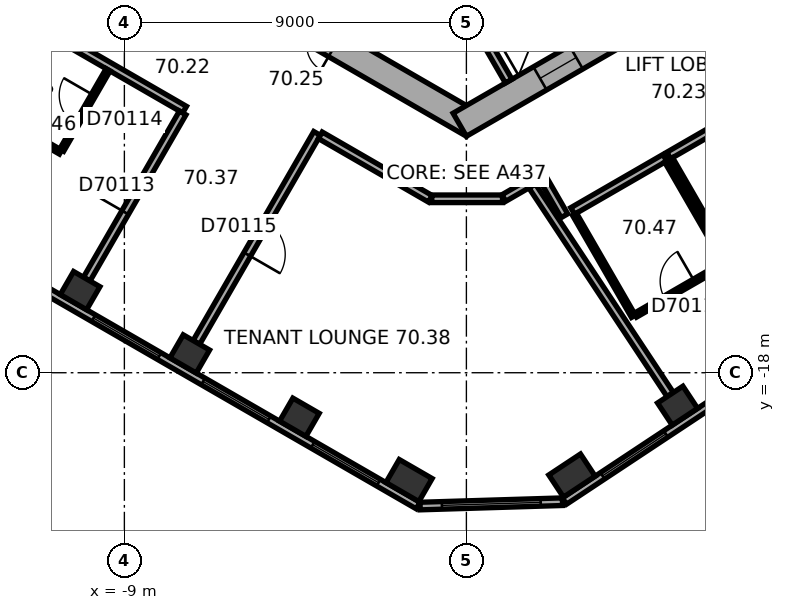
"""IFC4 building model, lengths in metres.
Left out: names, types, materials, properties, quantities, classifications, styles, units other than length and angle.
Written with IfcOpenShell. Run it as: python <this file> out.ifc"""

import sys

from ifc_helpers import new_model, si_unit, direction, frame, frame_2d, origin, origin_2d, place, context, subcontext, project, spatial, rectangle, extrude, element, fill, save


model = new_model("IFC4")
c1 = context("Model", 3, precision=1e-05, world=origin(), true_north=direction((0.0, 1.0)))
c2 = subcontext(c1, "Body", "Model", "MODEL_VIEW")
j1 = project(units=[si_unit("LENGTHUNIT", "METRE"), si_unit("PLANEANGLEUNIT", "RADIAN")], contexts=[c1])
p1 = place(None, origin())
s1 = spatial("IfcSite", under=j1, at=p1, CompositionType="ELEMENT")
p2 = place(p1, origin())
s2 = spatial("IfcBuilding", under=s1, at=p2, CompositionType="ELEMENT")
p3 = place(p2, frame((0.0, 0.0, 285.7)))
s3 = spatial("IfcBuildingStorey", under=s2, at=p3, CompositionType="ELEMENT", Elevation=285.7)
for number, where, z_axis, x_axis in (
    (1, (-10.165, -15.84, 0.0), (0.0, 0.0, 1.0), (0.866, -0.5, 0.0)),
    (2, (-7.28, -17.505, 0.0), (0.0, 0.0, 1.0), (0.866, -0.5, 0.0)),
    (3, (-4.395, -19.171, 0.0), (0.0, 0.0, 1.0), (0.866, -0.5, 0.0)),
):
    element("IfcColumn", number, at=place(p3, frame(where, z_axis=z_axis, x_axis=x_axis)), inside=s3, PredefinedType="COLUMN", context=c2, shape_type="SweptSolid", body=[
        extrude(rectangle(XDim=0.8, YDim=0.7, at=origin_2d()), origin(), (0.0, 0.0, 1.0), 3.7),
    ])
for number, where, z_axis, x_axis in (
    (4, (-1.509, -20.837, 0.0), (0.0, 0.0, 1.0), (0.866, -0.5, 0.0)),
    (5, (2.778, -20.706, 0.0), (0.0, 0.0, 1.0), (0.834, 0.552, 0.0)),
):
    element("IfcColumn", number, at=place(p3, frame(where, z_axis=z_axis, x_axis=x_axis)), inside=s3, PredefinedType="COLUMN", context=c2, shape_type="SweptSolid", body=[
        extrude(rectangle(XDim=1.0, YDim=0.7, at=origin_2d()), origin(), (0.0, 0.0, 1.0), 3.7),
    ])
p4 = place(p3, frame((5.557, -18.867, 0.0), z_axis=(0.0, 0.0, 1.0), x_axis=(0.833885822067, 0.551936985312, 0.0)))
e6 = element("IfcColumn", 6, at=p4, inside=s3, PredefinedType="COLUMN", context=c2, shape_type="SweptSolid", body=[
    extrude(rectangle(XDim=0.8, YDim=0.7, at=origin_2d()), origin(), (0.0, 0.0, 1.0), 3.7),
])
p5 = place(p3, frame((-10.025, -5.586, 0.0), z_axis=(0.0, 0.0, 1.0), x_axis=(0.866026453023, -0.499998182661, 0.0)))
e7 = element("IfcWall", 7, at=p5, inside=s3, PredefinedType="SHEAR", context=c2, shape_type="SweptSolid", body=[
    extrude(rectangle(XDim=11.778, YDim=0.7, at=frame_2d((5.889, 0.0))), origin(), (0.0, 0.0, 1.0), 3.7),
])
p6 = place(p5, frame((6.089, 0.0, 0.0)))
e8 = element("IfcOpeningElement", 8, at=p6, cuts=e7, PredefinedType="OPENING", context=c2, shape_type="SweptSolid", body=[
    extrude(rectangle(XDim=1.5, YDim=2.1, at=frame_2d((0.75, 1.05))), frame((0.0, 0.36, 0.0), z_axis=(0.0, -1.0, 0.0), x_axis=(1.0, 0.0, 0.0)), (0.0, 0.0, 1.0), 0.72),
])
p7 = place(p5, frame((1.539, 0.0, 0.0)))
e9 = element("IfcOpeningElement", 9, at=p7, cuts=e7, PredefinedType="OPENING", context=c2, shape_type="SweptSolid", body=[
    extrude(rectangle(XDim=1.1, YDim=2.1, at=frame_2d((0.55, 1.05))), frame((0.0, 0.36, 0.0), z_axis=(0.0, -1.0, 0.0), x_axis=(1.0, 0.0, 0.0)), (0.0, 0.0, 1.0), 0.72),
])
p8 = place(p5, frame((4.139, 0.0, 0.0)))
e10 = element("IfcOpeningElement", 10, at=p8, cuts=e7, PredefinedType="OPENING", context=c2, shape_type="SweptSolid", body=[
    extrude(rectangle(XDim=1.1, YDim=2.1, at=frame_2d((0.55, 1.05))), frame((0.0, 0.36, 0.0), z_axis=(0.0, -1.0, 0.0), x_axis=(1.0, 0.0, 0.0)), (0.0, 0.0, 1.0), 0.72),
])
p9 = place(p3, frame((-0.175, -11.475, 0.0), z_axis=(0.0, 0.0, 1.0), x_axis=(0.866026453023, 0.499998182661, 0.0)))
e11 = element("IfcWall", 11, at=p9, inside=s3, PredefinedType="SHEAR", context=c2, shape_type="SweptSolid", body=[
    extrude(rectangle(XDim=11.778, YDim=0.7, at=frame_2d((5.889, 0.0))), origin(), (0.0, 0.0, 1.0), 3.7),
])
p10 = place(p9, frame((2.439, 0.0, 0.0)))
e12 = element("IfcOpeningElement", 12, at=p10, cuts=e11, PredefinedType="OPENING", context=c2, shape_type="SweptSolid", body=[
    extrude(rectangle(XDim=1.1, YDim=2.1, at=frame_2d((0.55, 1.05))), frame((0.0, 0.36, 0.0), z_axis=(0.0, -1.0, 0.0), x_axis=(1.0, 0.0, 0.0)), (0.0, 0.0, 1.0), 0.72),
])
p11 = place(p9, frame((5.039, 0.0, 0.0)))
e13 = element("IfcOpeningElement", 13, at=p11, cuts=e11, PredefinedType="OPENING", context=c2, shape_type="SweptSolid", body=[
    extrude(rectangle(XDim=1.1, YDim=2.1, at=frame_2d((0.55, 1.05))), frame((0.0, 0.36, 0.0), z_axis=(0.0, -1.0, 0.0), x_axis=(1.0, 0.0, 0.0)), (0.0, 0.0, 1.0), 0.72),
])
p12 = place(p9, frame((7.639, 0.0, 0.0)))
e14 = element("IfcOpeningElement", 14, at=p12, cuts=e11, PredefinedType="OPENING", context=c2, shape_type="SweptSolid", body=[
    extrude(rectangle(XDim=1.1, YDim=2.1, at=frame_2d((0.55, 1.05))), frame((0.0, 0.36, 0.0), z_axis=(0.0, -1.0, 0.0), x_axis=(1.0, 0.0, 0.0)), (0.0, 0.0, 1.0), 0.72),
])
p13 = place(p3, frame((-16.626, -12.629, 0.0), z_axis=(0.0, 0.0, 1.0), x_axis=(0.866026460444, -0.499998169808, 0.0)))
e15 = element("IfcWall", 15, at=p13, inside=s3, PredefinedType="STANDARD", context=c2, shape_type="SweptSolid", body=[
    extrude(rectangle(XDim=17.731, YDim=0.2, at=frame_2d((8.866, 0.0))), origin(), (0.0, 0.0, 1.0), 3.7),
])
p14 = place(p13, frame((1.203, 0.0, 0.9)))
e16 = element("IfcOpeningElement", 16, at=p14, cuts=e15, PredefinedType="OPENING", context=c2, shape_type="SweptSolid", body=[
    extrude(rectangle(XDim=2.0, YDim=2.0, at=frame_2d((1.0, 1.0))), frame((0.0, 0.11, 0.0), z_axis=(0.0, -1.0, 0.0), x_axis=(1.0, 0.0, 0.0)), (0.0, 0.0, 1.0), 0.22),
])
p15 = place(p13, frame((4.535, 0.0, 0.9)))
e17 = element("IfcOpeningElement", 17, at=p15, cuts=e15, PredefinedType="OPENING", context=c2, shape_type="SweptSolid", body=[
    extrude(rectangle(XDim=2.0, YDim=2.0, at=frame_2d((1.0, 1.0))), frame((0.0, 0.11, 0.0), z_axis=(0.0, -1.0, 0.0), x_axis=(1.0, 0.0, 0.0)), (0.0, 0.0, 1.0), 0.22),
])
p16 = place(p13, frame((7.867, 0.0, 0.9)))
e18 = element("IfcOpeningElement", 18, at=p16, cuts=e15, PredefinedType="OPENING", context=c2, shape_type="SweptSolid", body=[
    extrude(rectangle(XDim=2.0, YDim=2.0, at=frame_2d((1.0, 1.0))), frame((0.0, 0.11, 0.0), z_axis=(0.0, -1.0, 0.0), x_axis=(1.0, 0.0, 0.0)), (0.0, 0.0, 1.0), 0.22),
])
p17 = place(p13, frame((11.198, 0.0, 0.9)))
e19 = element("IfcOpeningElement", 19, at=p17, cuts=e15, PredefinedType="OPENING", context=c2, shape_type="SweptSolid", body=[
    extrude(rectangle(XDim=2.0, YDim=2.0, at=frame_2d((1.0, 1.0))), frame((0.0, 0.11, 0.0), z_axis=(0.0, -1.0, 0.0), x_axis=(1.0, 0.0, 0.0)), (0.0, 0.0, 1.0), 0.22),
])
p18 = place(p13, frame((14.53, 0.0, 0.9)))
e20 = element("IfcOpeningElement", 20, at=p18, cuts=e15, PredefinedType="OPENING", context=c2, shape_type="SweptSolid", body=[
    extrude(rectangle(XDim=2.0, YDim=2.0, at=frame_2d((1.0, 1.0))), frame((0.0, 0.11, 0.0), z_axis=(0.0, -1.0, 0.0), x_axis=(1.0, 0.0, 0.0)), (0.0, 0.0, 1.0), 0.22),
])
p19 = place(p3, frame((-1.217, -21.508, 0.0), z_axis=(0.0, 0.0, 1.0), x_axis=(0.99953295295, 0.030559384285, 0.0)))
e21 = element("IfcWall", 21, at=p19, inside=s3, PredefinedType="STANDARD", context=c2, shape_type="SweptSolid", body=[
    extrude(rectangle(XDim=3.747, YDim=0.2, at=frame_2d((1.874, 0.0))), origin(), (0.0, 0.0, 1.0), 3.7),
])
p20 = place(p19, frame((0.573, 0.0, 0.9)))
e22 = element("IfcOpeningElement", 22, at=p20, cuts=e21, PredefinedType="OPENING", context=c2, shape_type="SweptSolid", body=[
    extrude(rectangle(XDim=2.6, YDim=2.0, at=frame_2d((1.3, 1.0))), frame((0.0, 0.11, 0.0), z_axis=(0.0, -1.0, 0.0), x_axis=(1.0, 0.0, 0.0)), (0.0, 0.0, 1.0), 0.22),
])
p21 = place(p3, frame((2.58, -21.377, 0.0), z_axis=(0.0, 0.0, 1.0), x_axis=(0.833888592176, 0.551932800112, 0.0)))
e23 = element("IfcWall", 23, at=p21, inside=s3, PredefinedType="STANDARD", context=c2, shape_type="SweptSolid", body=[
    extrude(rectangle(XDim=17.731, YDim=0.2, at=frame_2d((8.866, 0.0))), origin(), (0.0, 0.0, 1.0), 3.7),
])
p22 = place(p21, frame((1.202, 0.0, 0.9)))
e24 = element("IfcOpeningElement", 24, at=p22, cuts=e23, PredefinedType="OPENING", context=c2, shape_type="SweptSolid", body=[
    extrude(rectangle(XDim=2.0, YDim=2.0, at=frame_2d((1.0, 1.0))), frame((0.0, 0.11, 0.0), z_axis=(0.0, -1.0, 0.0), x_axis=(1.0, 0.0, 0.0)), (0.0, 0.0, 1.0), 0.22),
])
p23 = place(p21, frame((4.533, 0.0, 0.9)))
e25 = element("IfcOpeningElement", 25, at=p23, cuts=e23, PredefinedType="OPENING", context=c2, shape_type="SweptSolid", body=[
    extrude(rectangle(XDim=2.0, YDim=2.0, at=frame_2d((1.0, 1.0))), frame((0.0, 0.11, 0.0), z_axis=(0.0, -1.0, 0.0), x_axis=(1.0, 0.0, 0.0)), (0.0, 0.0, 1.0), 0.22),
])
p24 = place(p21, frame((7.865, 0.0, 0.9)))
e26 = element("IfcOpeningElement", 26, at=p24, cuts=e23, PredefinedType="OPENING", context=c2, shape_type="SweptSolid", body=[
    extrude(rectangle(XDim=2.0, YDim=2.0, at=frame_2d((1.0, 1.0))), frame((0.0, 0.11, 0.0), z_axis=(0.0, -1.0, 0.0), x_axis=(1.0, 0.0, 0.0)), (0.0, 0.0, 1.0), 0.22),
])
p25 = place(p21, frame((11.197, 0.0, 0.9)))
e27 = element("IfcOpeningElement", 27, at=p25, cuts=e23, PredefinedType="OPENING", context=c2, shape_type="SweptSolid", body=[
    extrude(rectangle(XDim=2.0, YDim=2.0, at=frame_2d((1.0, 1.0))), frame((0.0, 0.11, 0.0), z_axis=(0.0, -1.0, 0.0), x_axis=(1.0, 0.0, 0.0)), (0.0, 0.0, 1.0), 0.22),
])
p26 = place(p21, frame((14.528, 0.0, 0.9)))
e28 = element("IfcOpeningElement", 28, at=p26, cuts=e23, PredefinedType="OPENING", context=c2, shape_type="SweptSolid", body=[
    extrude(rectangle(XDim=2.0, YDim=2.0, at=frame_2d((1.0, 1.0))), frame((0.0, 0.11, 0.0), z_axis=(0.0, -1.0, 0.0), x_axis=(1.0, 0.0, 0.0)), (0.0, 0.0, 1.0), 0.22),
])
p27 = place(p3, frame((0.013, -8.422, 0.0), z_axis=(0.0, 0.0, 1.0), x_axis=(0.500077893725, -0.86598042715, 0.0)))
e29 = element("IfcWall", 29, at=p27, inside=s3, PredefinedType="PARTITIONING", context=c2, shape_type="SweptSolid", body=[
    extrude(rectangle(XDim=2.2, YDim=0.2, at=frame_2d((1.1, 0.0))), origin(), (0.0, 0.0, 1.0), 3.42),
])
p28 = place(p3, frame((-11.285, -8.844, 0.0), z_axis=(0.0, 0.0, 1.0), x_axis=(0.866021785011, -0.500006267848, 0.0)))
e30 = element("IfcWall", 30, at=p28, inside=s3, PredefinedType="PARTITIONING", context=c2, shape_type="SweptSolid", body=[
    extrude(rectangle(XDim=4.468, YDim=0.2, at=frame_2d((2.234, 0.0))), origin(), (0.0, 0.0, 1.0), 3.42),
])
p29 = place(p3, frame((-10.679, -12.195, 0.0), z_axis=(0.0, 0.0, 1.0), x_axis=(-0.866037418504, 0.499979189318, 0.0)))
e31 = element("IfcWall", 31, at=p29, inside=s3, PredefinedType="PARTITIONING", context=c2, shape_type="SweptSolid", body=[
    extrude(rectangle(XDim=2.14, YDim=0.12, at=frame_2d((1.07, 0.0))), origin(), (0.0, 0.0, 1.0), 3.42),
])
p30 = place(p3, frame((-9.99, -15.537, 0.0), z_axis=(0.0, 0.0, 1.0), x_axis=(0.499966611936, 0.866044679534, 0.0)))
e32 = element("IfcWall", 32, at=p30, inside=s3, PredefinedType="PARTITIONING", context=c2, shape_type="SweptSolid", body=[
    extrude(rectangle(XDim=5.049, YDim=0.2, at=frame_2d((2.524, 0.0))), origin(), (0.0, 0.0, 1.0), 2.87),
])
p31 = place(p30, frame((2.024, 0.0, 0.0)))
e33 = element("IfcOpeningElement", 33, at=p31, cuts=e32, PredefinedType="OPENING", context=c2, shape_type="SweptSolid", body=[
    extrude(rectangle(XDim=1.0, YDim=2.1, at=frame_2d((0.5, 1.05))), frame((0.0, 0.11, 0.0), z_axis=(0.0, -1.0, 0.0), x_axis=(1.0, 0.0, 0.0)), (0.0, 0.0, 1.0), 0.22),
])
p32 = place(p3, frame((-9.429, -10.03, 0.0), z_axis=(0.0, 0.0, 1.0), x_axis=(-0.500034220881, -0.866005645448, 0.0)))
e34 = element("IfcWall", 34, at=p32, inside=s3, PredefinedType="PARTITIONING", context=c2, shape_type="SweptSolid", body=[
    extrude(rectangle(XDim=2.44, YDim=0.12, at=frame_2d((1.22, 0.0))), origin(), (0.0, 0.0, 1.0), 3.42),
])
p33 = place(p32, frame((0.77, 0.0, 0.0)))
e35 = element("IfcOpeningElement", 35, at=p33, cuts=e34, PredefinedType="OPENING", context=c2, shape_type="SweptSolid", body=[
    extrude(rectangle(XDim=0.9, YDim=2.1, at=frame_2d((0.45, 1.05))), frame((0.0, 0.07, 0.0), z_axis=(0.0, -1.0, 0.0), x_axis=(1.0, 0.0, 0.0)), (0.0, 0.0, 1.0), 0.14),
])
p34 = place(p3, frame((-7.105, -17.202, 0.0), z_axis=(0.0, 0.0, 1.0), x_axis=(0.499988692146, 0.866031932279, 0.0)))
e36 = element("IfcWall", 36, at=p34, inside=s3, PredefinedType="PARTITIONING", context=c2, shape_type="SweptSolid", body=[
    extrude(rectangle(XDim=6.35, YDim=0.2, at=frame_2d((3.175, 0.0))), origin(), (0.0, 0.0, 1.0), 3.42),
])
p35 = place(p34, frame((2.675, 0.0, 0.0)))
e37 = element("IfcOpeningElement", 37, at=p35, cuts=e36, PredefinedType="OPENING", context=c2, shape_type="SweptSolid", body=[
    extrude(rectangle(XDim=1.0, YDim=2.1, at=frame_2d((0.5, 1.05))), frame((0.0, 0.11, 0.0), z_axis=(0.0, -1.0, 0.0), x_axis=(1.0, 0.0, 0.0)), (0.0, 0.0, 1.0), 0.22),
])
p36 = place(p3, frame((-3.843, -11.753, 0.0), z_axis=(0.0, 0.0, 1.0), x_axis=(0.866031037473, -0.499990242038, 0.0)))
e38 = element("IfcWall", 38, at=p36, inside=s3, PredefinedType="PARTITIONING", context=c2, shape_type="SweptSolid", body=[
    extrude(rectangle(XDim=3.341, YDim=0.2, at=frame_2d((1.67, 0.0))), origin(), (0.0, 0.0, 1.0), 3.42),
])
p37 = place(p3, frame((-0.91, -13.423, 0.0), z_axis=(0.0, 0.0, 1.0), x_axis=(1.0, 0.0, 0.0)))
e39 = element("IfcWall", 39, at=p37, inside=s3, PredefinedType="PARTITIONING", context=c2, shape_type="SweptSolid", body=[
    extrude(rectangle(XDim=1.86, YDim=0.2, at=frame_2d((0.93, 0.0))), origin(), (0.0, 0.0, 1.0), 3.42),
])
p38 = place(p3, frame((0.985, -13.403, 0.0), z_axis=(0.0, 0.0, 1.0), x_axis=(0.866032814021, 0.499987164874, 0.0)))
e40 = element("IfcWall", 40, at=p38, inside=s3, PredefinedType="PARTITIONING", context=c2, shape_type="SweptSolid", body=[
    extrude(rectangle(XDim=0.798, YDim=0.2, at=frame_2d((0.399, 0.0))), origin(), (0.0, 0.0, 1.0), 3.42),
])
p39 = place(p3, frame((1.979, -12.829, 0.0), z_axis=(0.0, 0.0, 1.0), x_axis=(0.500074377092, -0.865982457891, 0.0)))
e41 = element("IfcWall", 41, at=p39, inside=s3, PredefinedType="PARTITIONING", context=c2, shape_type="SweptSolid", body=[
    extrude(rectangle(XDim=1.201, YDim=0.2, at=frame_2d((0.601, 0.0))), origin(), (0.0, 0.0, 1.0), 3.42),
])
p40 = place(p3, frame((2.796, -13.744, 0.0), z_axis=(0.0, 0.0, 1.0), x_axis=(0.866034573852, 0.49998411664, 0.0)))
e42 = element("IfcWall", 42, at=p40, inside=s3, PredefinedType="PARTITIONING", context=c2, shape_type="SweptSolid", body=[
    extrude(rectangle(XDim=2.8, YDim=0.2, at=frame_2d((1.4, 0.0))), origin(), (0.0, 0.0, 1.0), 3.42),
])
p41 = place(p3, frame((4.396, -16.516, 0.0), z_axis=(0.0, 0.0, 1.0), x_axis=(-0.49999285859, 0.86602952684, 0.0)))
e43 = element("IfcWall", 43, at=p41, inside=s3, PredefinedType="PARTITIONING", context=c2, shape_type="SweptSolid", body=[
    extrude(rectangle(XDim=3.1, YDim=0.12, at=frame_2d((1.55, 0.0))), origin(), (0.0, 0.0, 1.0), 3.42),
])
p42 = place(p3, frame((5.271, -12.431, 0.0), z_axis=(0.0, 0.0, 1.0), x_axis=(0.500026960575, -0.86600983753, 0.0)))
e44 = element("IfcWall", 44, at=p42, inside=s3, PredefinedType="PARTITIONING", context=c2, shape_type="SweptSolid", body=[
    extrude(rectangle(XDim=3.1, YDim=0.12, at=frame_2d((1.55, 0.0))), origin(), (0.0, 0.0, 1.0), 3.42),
])
p43 = place(p3, frame((5.325, -12.284, 0.0), z_axis=(0.0, 0.0, 1.0), x_axis=(0.866034573852, 0.49998411664, 0.0)))
e45 = element("IfcWall", 45, at=p43, inside=s3, PredefinedType="PARTITIONING", context=c2, shape_type="SweptSolid", body=[
    extrude(rectangle(XDim=2.8, YDim=0.2, at=frame_2d((1.4, 0.0))), origin(), (0.0, 0.0, 1.0), 3.42),
])
p44 = place(p3, frame((5.364, -18.575, 0.0), z_axis=(0.0, 0.0, 1.0), x_axis=(-0.55195757761, 0.833872191957, 0.0)))
e46 = element("IfcWall", 46, at=p44, inside=s3, PredefinedType="PARTITIONING", context=c2, shape_type="SweptSolid", body=[
    extrude(rectangle(XDim=6.581, YDim=0.2, at=frame_2d((3.291, 0.0))), origin(), (0.0, 0.0, 1.0), 3.42),
])
p45 = place(p3, frame((6.769, -15.146, 0.0), z_axis=(0.0, 0.0, 1.0), x_axis=(-0.866020236886, -0.500008949224, 0.0)))
e47 = element("IfcWall", 47, at=p45, inside=s3, PredefinedType="PARTITIONING", context=c2, shape_type="SweptSolid", body=[
    extrude(rectangle(XDim=2.68, YDim=0.12, at=frame_2d((1.34, 0.0))), origin(), (0.0, 0.0, 1.0), 3.42),
])
p46 = place(p45, frame((0.89, 0.0, 0.0)))
e48 = element("IfcOpeningElement", 48, at=p46, cuts=e47, PredefinedType="OPENING", context=c2, shape_type="SweptSolid", body=[
    extrude(rectangle(XDim=0.9, YDim=2.1, at=frame_2d((0.45, 1.05))), frame((0.0, 0.07, 0.0), z_axis=(0.0, -1.0, 0.0), x_axis=(1.0, 0.0, 0.0)), (0.0, 0.0, 1.0), 0.14),
])
p47 = place(p3, frame((6.925, -15.056, 0.0), z_axis=(0.0, 0.0, 1.0), x_axis=(-0.49999285859, 0.86602952684, 0.0)))
e49 = element("IfcWall", 49, at=p47, inside=s3, PredefinedType="PARTITIONING", context=c2, shape_type="SweptSolid", body=[
    extrude(rectangle(XDim=3.1, YDim=0.12, at=frame_2d((1.55, 0.0))), origin(), (0.0, 0.0, 1.0), 2.87),
])
p48 = place(p16, origin())
e50 = element("IfcWindow", 50, at=p48, inside=s3, PartitioningType="SINGLE_PANEL", PredefinedType="WINDOW", context=c2, shape_type="SweptSolid", body=[
    extrude(rectangle(XDim=2.0, YDim=2.0, at=frame_2d((1.0, 1.0))), frame((0.0, 0.03, 0.0), z_axis=(0.0, -1.0, 0.0), x_axis=(1.0, 0.0, 0.0)), (0.0, 0.0, 1.0), 0.06),
])
fill(e18, e50)
p49 = place(p17, origin())
e51 = element("IfcWindow", 51, at=p49, inside=s3, PartitioningType="SINGLE_PANEL", PredefinedType="WINDOW", context=c2, shape_type="SweptSolid", body=[
    extrude(rectangle(XDim=2.0, YDim=2.0, at=frame_2d((1.0, 1.0))), frame((0.0, 0.03, 0.0), z_axis=(0.0, -1.0, 0.0), x_axis=(1.0, 0.0, 0.0)), (0.0, 0.0, 1.0), 0.06),
])
fill(e19, e51)
p50 = place(p18, origin())
e52 = element("IfcWindow", 52, at=p50, inside=s3, PartitioningType="SINGLE_PANEL", PredefinedType="WINDOW", context=c2, shape_type="SweptSolid", body=[
    extrude(rectangle(XDim=2.0, YDim=2.0, at=frame_2d((1.0, 1.0))), frame((0.0, 0.03, 0.0), z_axis=(0.0, -1.0, 0.0), x_axis=(1.0, 0.0, 0.0)), (0.0, 0.0, 1.0), 0.06),
])
fill(e20, e52)
p51 = place(p20, origin())
e53 = element("IfcWindow", 53, at=p51, inside=s3, PartitioningType="SINGLE_PANEL", PredefinedType="WINDOW", context=c2, shape_type="SweptSolid", body=[
    extrude(rectangle(XDim=2.6, YDim=2.0, at=frame_2d((1.3, 1.0))), frame((0.0, 0.03, 0.0), z_axis=(0.0, -1.0, 0.0), x_axis=(1.0, 0.0, 0.0)), (0.0, 0.0, 1.0), 0.06),
])
fill(e22, e53)
p52 = place(p22, origin())
e54 = element("IfcWindow", 54, at=p52, inside=s3, PartitioningType="SINGLE_PANEL", PredefinedType="WINDOW", context=c2, shape_type="SweptSolid", body=[
    extrude(rectangle(XDim=2.0, YDim=2.0, at=frame_2d((1.0, 1.0))), frame((0.0, 0.03, 0.0), z_axis=(0.0, -1.0, 0.0), x_axis=(1.0, 0.0, 0.0)), (0.0, 0.0, 1.0), 0.06),
])
fill(e24, e54)
p53 = place(p10, origin())
e55 = element("IfcDoor", 55, at=p53, inside=s3, OperationType="DOUBLE_DOOR_SLIDING", PredefinedType="DOOR", context=c2, shape_type="SweptSolid", body=[
    extrude(rectangle(XDim=1.1, YDim=2.1, at=frame_2d((0.55, 1.05))), frame((0.0, 0.025, 0.0), z_axis=(0.0, -1.0, 0.0), x_axis=(1.0, 0.0, 0.0)), (0.0, 0.0, 1.0), 0.05),
])
fill(e12, e55)
p54 = place(p31, origin())
e56 = element("IfcDoor", 56, at=p54, inside=s3, OperationType="SINGLE_SWING_LEFT", PredefinedType="DOOR", context=c2, shape_type="SweptSolid", body=[
    extrude(rectangle(XDim=1.0, YDim=2.1, at=frame_2d((0.5, 1.05))), frame((0.0, 0.025, 0.0), z_axis=(0.0, -1.0, 0.0), x_axis=(1.0, 0.0, 0.0)), (0.0, 0.0, 1.0), 0.05),
])
fill(e33, e56)
p55 = place(p33, origin())
e57 = element("IfcDoor", 57, at=p55, inside=s3, OperationType="SINGLE_SWING_LEFT", PredefinedType="DOOR", context=c2, shape_type="SweptSolid", body=[
    extrude(rectangle(XDim=0.9, YDim=2.1, at=frame_2d((0.45, 1.05))), frame((0.0, 0.025, 0.0), z_axis=(0.0, -1.0, 0.0), x_axis=(1.0, 0.0, 0.0)), (0.0, 0.0, 1.0), 0.05),
])
fill(e35, e57)
p56 = place(p35, origin())
e58 = element("IfcDoor", 58, at=p56, inside=s3, OperationType="SINGLE_SWING_LEFT", PredefinedType="DOOR", context=c2, shape_type="SweptSolid", body=[
    extrude(rectangle(XDim=1.0, YDim=2.1, at=frame_2d((0.5, 1.05))), frame((0.0, 0.025, 0.0), z_axis=(0.0, -1.0, 0.0), x_axis=(1.0, 0.0, 0.0)), (0.0, 0.0, 1.0), 0.05),
])
fill(e37, e58)
p57 = place(p46, origin())
e59 = element("IfcDoor", 59, at=p57, inside=s3, OperationType="SINGLE_SWING_LEFT", PredefinedType="DOOR", context=c2, shape_type="SweptSolid", body=[
    extrude(rectangle(XDim=0.9, YDim=2.1, at=frame_2d((0.45, 1.05))), frame((0.0, 0.025, 0.0), z_axis=(0.0, -1.0, 0.0), x_axis=(1.0, 0.0, 0.0)), (0.0, 0.0, 1.0), 0.05),
])
fill(e48, e59)
save(model, sys.argv[1])
